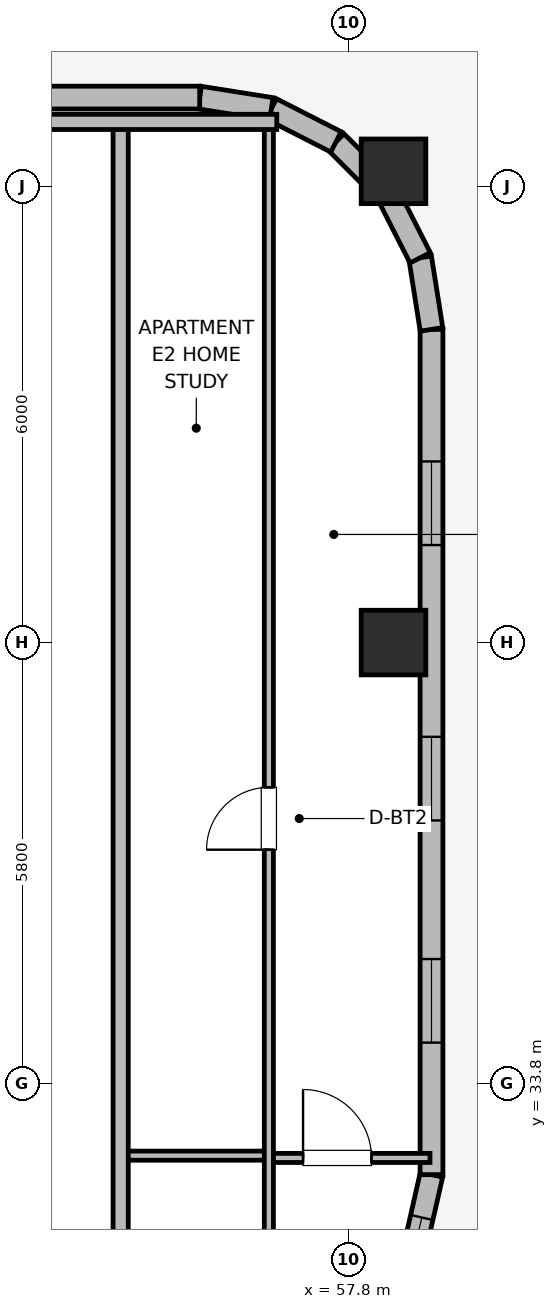
"""IFC4 building model, lengths in metres.
Left out: names, types, materials, properties, quantities, classifications, styles, units other than length and angle.
Written with IfcOpenShell. Run it as: python <this file> out.ifc"""

import sys

from ifc_helpers import new_model, si_unit, direction, frame, frame_2d, origin, origin_2d, place, context, subcontext, project, spatial, rectangle, extrude, element, fill, save


model = new_model("IFC4")
c1 = context("Model", 3, precision=1e-05, world=origin(), true_north=direction((0.0, 1.0)))
c2 = subcontext(c1, "Body", "Model", "MODEL_VIEW")
j1 = project(units=[si_unit("LENGTHUNIT", "METRE"), si_unit("PLANEANGLEUNIT", "RADIAN")], contexts=[c1])
p1 = place(None, origin())
s1 = spatial("IfcSite", under=j1, at=p1, CompositionType="ELEMENT")
p2 = place(p1, origin())
s2 = spatial("IfcBuilding", under=s1, at=p2, CompositionType="ELEMENT")
p3 = place(p2, frame((0.0, 0.0, 225.8)))
s3 = spatial("IfcBuildingStorey", under=s2, at=p3, CompositionType="ELEMENT", Elevation=225.8)
for number, where, z_axis, x_axis in (
    (1, (58.39, 39.6, 0.0), (0.0, 0.0, 1.0), (1.0, 0.0, 0.0)),
    (2, (58.39, 45.8, 0.0), (0.0, 0.0, 1.0), (1.0, 0.0, 0.0)),
):
    element("IfcColumn", number, at=place(p3, frame(where, z_axis=z_axis, x_axis=x_axis)), inside=s3, PredefinedType="COLUMN", context=c2, shape_type="SweptSolid", body=[
        extrude(rectangle(XDim=0.85, YDim=0.85, at=origin_2d()), origin(), (0.0, 0.0, 1.0), 3.7),
    ])
p4 = place(p3, frame((58.39, 30.4, 0.0), z_axis=(0.0, 0.0, 1.0), x_axis=(0.221602396322, 0.975137107254, 0.0)))
e3 = element("IfcWall", 3, at=p4, inside=s3, PredefinedType="SOLIDWALL", context=c2, shape_type="SweptSolid", body=[
    extrude(rectangle(XDim=2.256, YDim=0.3, at=frame_2d((1.128, 0.0))), origin(), (0.0, 0.0, 1.0), 2.73),
])
p5 = place(p4, frame((0.578, 0.0, 0.92)))
e4 = element("IfcOpeningElement", 4, at=p5, cuts=e3, PredefinedType="OPENING", context=c2, shape_type="SweptSolid", body=[
    extrude(rectangle(XDim=1.1, YDim=1.65, at=frame_2d((0.55, 0.825))), frame((0.0, 0.16, 0.0), z_axis=(0.0, -1.0, 0.0), x_axis=(1.0, 0.0, 0.0)), (0.0, 0.0, 1.0), 0.32),
])
p6 = place(p3, frame((58.89, 32.6, 0.0), z_axis=(0.0, 0.0, 1.0), x_axis=(0.0, 1.0, 0.0)))
e5 = element("IfcWall", 5, at=p6, inside=s3, PredefinedType="SOLIDWALL", context=c2, shape_type="SweptSolid", body=[
    extrude(rectangle(XDim=11.12, YDim=0.3, at=frame_2d((5.56, 0.0))), origin(), (0.0, 0.0, 1.0), 2.73),
])
p7 = place(p6, frame((1.737, 0.0, 0.95)))
e6 = element("IfcOpeningElement", 6, at=p7, cuts=e5, PredefinedType="OPENING", context=c2, shape_type="SweptSolid", body=[
    extrude(rectangle(XDim=1.1, YDim=1.65, at=frame_2d((0.55, 0.825))), frame((0.0, 0.16, 0.0), z_axis=(0.0, -1.0, 0.0), x_axis=(1.0, 0.0, 0.0)), (0.0, 0.0, 1.0), 0.32),
])
p8 = place(p6, frame((4.66, 0.0, 0.95)))
e7 = element("IfcOpeningElement", 7, at=p8, cuts=e5, PredefinedType="OPENING", context=c2, shape_type="SweptSolid", body=[
    extrude(rectangle(XDim=1.1, YDim=1.65, at=frame_2d((0.55, 0.825))), frame((0.0, 0.16, 0.0), z_axis=(0.0, -1.0, 0.0), x_axis=(1.0, 0.0, 0.0)), (0.0, 0.0, 1.0), 0.32),
])
p9 = place(p6, frame((8.283, 0.0, 0.95)))
e8 = element("IfcOpeningElement", 8, at=p9, cuts=e5, PredefinedType="OPENING", context=c2, shape_type="SweptSolid", body=[
    extrude(rectangle(XDim=1.1, YDim=1.65, at=frame_2d((0.55, 0.825))), frame((0.0, 0.16, 0.0), z_axis=(0.0, -1.0, 0.0), x_axis=(1.0, 0.0, 0.0)), (0.0, 0.0, 1.0), 0.32),
])
p10 = place(p3, frame((58.89, 43.72, 0.0), z_axis=(0.0, 0.0, 1.0), x_axis=(-0.156304114255, 0.987708977314, 0.0)))
e9 = element("IfcWall", 9, at=p10, inside=s3, PredefinedType="SOLIDWALL", context=c2, shape_type="SweptSolid", body=[
    extrude(rectangle(XDim=0.954, YDim=0.3, at=frame_2d((0.477, 0.0))), origin(), (0.0, 0.0, 1.0), 2.73),
])
p11 = place(p3, frame((58.741, 44.663, 0.0), z_axis=(0.0, 0.0, 1.0), x_axis=(-0.45395644796, 0.891023873617, 0.0)))
e10 = element("IfcWall", 10, at=p11, inside=s3, PredefinedType="SOLIDWALL", context=c2, shape_type="SweptSolid", body=[
    extrude(rectangle(XDim=0.954, YDim=0.3, at=frame_2d((0.477, 0.0))), origin(), (0.0, 0.0, 1.0), 2.73),
])
for number, where, z_axis, x_axis in (
    (11, (58.308, 45.513, 0.0), (0.0, 0.0, 1.0), (-0.707, 0.707, 0.0)),
    (12, (57.633, 46.188, 0.0), (0.0, 0.0, 1.0), (-0.891, 0.454, 0.0)),
):
    element("IfcWall", number, at=place(p3, frame(where, z_axis=z_axis, x_axis=x_axis)), inside=s3, PredefinedType="SOLIDWALL", context=c2, shape_type="SweptSolid", body=[
        extrude(rectangle(XDim=0.954, YDim=0.3, at=frame_2d((0.477, 0.0))), origin(), (0.0, 0.0, 1.0), 2.73),
    ])
p12 = place(p3, frame((56.782, 46.621, 0.0), z_axis=(0.0, 0.0, 1.0), x_axis=(-0.987663181641, 0.156593229835, 0.0)))
e13 = element("IfcWall", 13, at=p12, inside=s3, PredefinedType="SOLIDWALL", context=c2, shape_type="SweptSolid", body=[
    extrude(rectangle(XDim=0.954, YDim=0.3, at=frame_2d((0.477, 0.0))), origin(), (0.0, 0.0, 1.0), 2.73),
])
p13 = place(p3, frame((55.84, 46.77, 0.0), z_axis=(0.0, 0.0, 1.0), x_axis=(-1.0, 0.0, 0.0)))
e14 = element("IfcWall", 14, at=p13, inside=s3, PredefinedType="SOLIDWALL", context=c2, shape_type="SweptSolid", body=[
    extrude(rectangle(XDim=33.28, YDim=0.3, at=frame_2d((16.64, 0.0))), origin(), (0.0, 0.0, 1.0), 2.73),
])
p14 = place(p13, frame((4.93, 0.0, 0.71)))
e15 = element("IfcOpeningElement", 15, at=p14, cuts=e14, PredefinedType="OPENING", context=c2, shape_type="SweptSolid", body=[
    extrude(rectangle(XDim=2.1, YDim=1.9, at=frame_2d((1.05, 0.95))), frame((0.0, 0.16, 0.0), z_axis=(0.0, -1.0, 0.0), x_axis=(1.0, 0.0, 0.0)), (0.0, 0.0, 1.0), 0.32),
])
p15 = place(p13, frame((8.483, 0.0, 0.71)))
e16 = element("IfcOpeningElement", 16, at=p15, cuts=e14, PredefinedType="OPENING", context=c2, shape_type="SweptSolid", body=[
    extrude(rectangle(XDim=2.1, YDim=1.9, at=frame_2d((1.05, 0.95))), frame((0.0, 0.16, 0.0), z_axis=(0.0, -1.0, 0.0), x_axis=(1.0, 0.0, 0.0)), (0.0, 0.0, 1.0), 0.32),
])
p16 = place(p13, frame((15.59, 0.0, 0.71)))
e17 = element("IfcOpeningElement", 17, at=p16, cuts=e14, PredefinedType="OPENING", context=c2, shape_type="SweptSolid", body=[
    extrude(rectangle(XDim=2.1, YDim=1.9, at=frame_2d((1.05, 0.95))), frame((0.0, 0.16, 0.0), z_axis=(0.0, -1.0, 0.0), x_axis=(1.0, 0.0, 0.0)), (0.0, 0.0, 1.0), 0.32),
])
p17 = place(p13, frame((22.697, 0.0, 0.71)))
e18 = element("IfcOpeningElement", 18, at=p17, cuts=e14, PredefinedType="OPENING", context=c2, shape_type="SweptSolid", body=[
    extrude(rectangle(XDim=2.1, YDim=1.9, at=frame_2d((1.05, 0.95))), frame((0.0, 0.16, 0.0), z_axis=(0.0, -1.0, 0.0), x_axis=(1.0, 0.0, 0.0)), (0.0, 0.0, 1.0), 0.32),
])
p18 = place(p13, frame((26.25, 0.0, 0.71)))
e19 = element("IfcOpeningElement", 19, at=p18, cuts=e14, PredefinedType="OPENING", context=c2, shape_type="SweptSolid", body=[
    extrude(rectangle(XDim=2.1, YDim=1.9, at=frame_2d((1.05, 0.95))), frame((0.0, 0.16, 0.0), z_axis=(0.0, -1.0, 0.0), x_axis=(1.0, 0.0, 0.0)), (0.0, 0.0, 1.0), 0.32),
])
p19 = place(p3, frame((54.8, 32.85, 0.0), z_axis=(0.0, 0.0, 1.0), x_axis=(1.0, 0.0, 0.0)))
e20 = element("IfcWall", 20, at=p19, inside=s3, PredefinedType="PARTITIONING", context=c2, shape_type="SweptSolid", body=[
    extrude(rectangle(XDim=1.95, YDim=0.12, at=frame_2d((0.975, 0.0))), origin(), (0.0, 0.0, 1.0), 2.56),
])
p20 = place(p3, frame((56.75, 32.82, 0.0), z_axis=(0.0, 0.0, 1.0), x_axis=(1.0, 0.0, 0.0)))
e21 = element("IfcWall", 21, at=p20, inside=s3, PredefinedType="PARTITIONING", context=c2, shape_type="SweptSolid", body=[
    extrude(rectangle(XDim=2.12, YDim=0.12, at=frame_2d((1.06, 0.0))), origin(), (0.0, 0.0, 1.0), 2.56),
])
p21 = place(p20, frame((0.45, 0.0, 0.0)))
e22 = element("IfcOpeningElement", 22, at=p21, cuts=e21, PredefinedType="OPENING", context=c2, shape_type="SweptSolid", body=[
    extrude(rectangle(XDim=0.9, YDim=2.1, at=frame_2d((0.45, 1.05))), frame((0.0, 0.07, 0.0), z_axis=(0.0, -1.0, 0.0), x_axis=(1.0, 0.0, 0.0)), (0.0, 0.0, 1.0), 0.14),
])
p22 = place(p3, frame((56.75, 23.69, 0.0), z_axis=(0.0, 0.0, 1.0), x_axis=(0.0, 1.0, 0.0)))
e23 = element("IfcWall", 23, at=p22, inside=s3, PredefinedType="PARTITIONING", context=c2, shape_type="SweptSolid", body=[
    extrude(rectangle(XDim=22.72, YDim=0.12, at=frame_2d((11.36, 0.0))), origin(), (0.0, 0.0, 1.0), 2.56),
])
p23 = place(p22, frame((0.41, 0.0, 0.0)))
e24 = element("IfcOpeningElement", 24, at=p23, cuts=e23, PredefinedType="OPENING", context=c2, shape_type="SweptSolid", body=[
    extrude(rectangle(XDim=0.9, YDim=2.1, at=frame_2d((0.45, 1.05))), frame((0.0, 0.07, 0.0), z_axis=(0.0, -1.0, 0.0), x_axis=(1.0, 0.0, 0.0)), (0.0, 0.0, 1.0), 0.14),
])
p24 = place(p22, frame((13.185, 0.0, 0.0)))
e25 = element("IfcOpeningElement", 25, at=p24, cuts=e23, PredefinedType="OPENING", context=c2, shape_type="SweptSolid", body=[
    extrude(rectangle(XDim=0.82, YDim=2.08, at=frame_2d((0.41, 1.04))), frame((0.0, 0.07, 0.0), z_axis=(0.0, -1.0, 0.0), x_axis=(1.0, 0.0, 0.0)), (0.0, 0.0, 1.0), 0.14),
])
p25 = place(p3, frame((54.8, 9.95, 0.0), z_axis=(0.0, 0.0, 1.0), x_axis=(0.0, 1.0, 0.0)))
e26 = element("IfcWall", 26, at=p25, inside=s3, PredefinedType="PARTITIONING", context=c2, shape_type="SweptSolid", body=[
    extrude(rectangle(XDim=36.5, YDim=0.2, at=frame_2d((18.25, 0.0))), origin(), (0.0, 0.0, 1.0), 2.56),
])
p26 = place(p25, frame((3.25, 0.0, 0.0)))
e27 = element("IfcOpeningElement", 27, at=p26, cuts=e26, PredefinedType="OPENING", context=c2, shape_type="SweptSolid", body=[
    extrude(rectangle(XDim=1.0, YDim=2.15, at=frame_2d((0.5, 1.075))), frame((0.0, 0.11, 0.0), z_axis=(0.0, -1.0, 0.0), x_axis=(1.0, 0.0, 0.0)), (0.0, 0.0, 1.0), 0.22),
])
p27 = place(p25, frame((14.25, 0.0, 0.0)))
e28 = element("IfcOpeningElement", 28, at=p27, cuts=e26, PredefinedType="OPENING", context=c2, shape_type="SweptSolid", body=[
    extrude(rectangle(XDim=1.0, YDim=2.15, at=frame_2d((0.5, 1.075))), frame((0.0, 0.11, 0.0), z_axis=(0.0, -1.0, 0.0), x_axis=(1.0, 0.0, 0.0)), (0.0, 0.0, 1.0), 0.22),
])
p28 = place(p3, frame((53.1, 46.45, 0.0), z_axis=(0.0, 0.0, 1.0), x_axis=(1.0, 0.0, 0.0)))
e29 = element("IfcWall", 29, at=p28, inside=s3, PredefinedType="PARTITIONING", context=c2, shape_type="SweptSolid", body=[
    extrude(rectangle(XDim=3.754, YDim=0.2, at=frame_2d((1.877, 0.0))), origin(), (0.0, 0.0, 1.0), 2.56),
])
p29 = place(p5, origin())
e30 = element("IfcWindow", 30, at=p29, inside=s3, PartitioningType="SINGLE_PANEL", PredefinedType="WINDOW", context=c2, shape_type="SweptSolid", body=[
    extrude(rectangle(XDim=1.1, YDim=1.65, at=frame_2d((0.55, 0.825))), frame((0.0, 0.03, 0.0), z_axis=(0.0, -1.0, 0.0), x_axis=(1.0, 0.0, 0.0)), (0.0, 0.0, 1.0), 0.06),
])
fill(e4, e30)
p30 = place(p7, origin())
e31 = element("IfcWindow", 31, at=p30, inside=s3, PartitioningType="SINGLE_PANEL", PredefinedType="WINDOW", context=c2, shape_type="SweptSolid", body=[
    extrude(rectangle(XDim=1.1, YDim=1.65, at=frame_2d((0.55, 0.825))), frame((0.0, 0.03, 0.0), z_axis=(0.0, -1.0, 0.0), x_axis=(1.0, 0.0, 0.0)), (0.0, 0.0, 1.0), 0.06),
])
fill(e6, e31)
p31 = place(p8, origin())
e32 = element("IfcWindow", 32, at=p31, inside=s3, PartitioningType="SINGLE_PANEL", PredefinedType="WINDOW", context=c2, shape_type="SweptSolid", body=[
    extrude(rectangle(XDim=1.1, YDim=1.65, at=frame_2d((0.55, 0.825))), frame((0.0, 0.03, 0.0), z_axis=(0.0, -1.0, 0.0), x_axis=(1.0, 0.0, 0.0)), (0.0, 0.0, 1.0), 0.06),
])
fill(e7, e32)
p32 = place(p9, origin())
e33 = element("IfcWindow", 33, at=p32, inside=s3, PartitioningType="SINGLE_PANEL", PredefinedType="WINDOW", context=c2, shape_type="SweptSolid", body=[
    extrude(rectangle(XDim=1.1, YDim=1.65, at=frame_2d((0.55, 0.825))), frame((0.0, 0.03, 0.0), z_axis=(0.0, -1.0, 0.0), x_axis=(1.0, 0.0, 0.0)), (0.0, 0.0, 1.0), 0.06),
])
fill(e8, e33)
p33 = place(p21, origin())
e34 = element("IfcDoor", 34, at=p33, inside=s3, OperationType="SINGLE_SWING_LEFT", PredefinedType="DOOR", context=c2, shape_type="SweptSolid", body=[
    extrude(rectangle(XDim=0.9, YDim=2.1, at=frame_2d((0.45, 1.05))), frame((0.0, 0.025, 0.0), z_axis=(0.0, -1.0, 0.0), x_axis=(1.0, 0.0, 0.0)), (0.0, 0.0, 1.0), 0.05),
])
fill(e22, e34)
p34 = place(p24, origin())
e35 = element("IfcDoor", 35, at=p34, inside=s3, OperationType="SINGLE_SWING_LEFT", PredefinedType="DOOR", context=c2, shape_type="SweptSolid", body=[
    extrude(rectangle(XDim=0.82, YDim=2.08, at=frame_2d((0.41, 1.04))), frame((0.0, 0.025, 0.0), z_axis=(0.0, -1.0, 0.0), x_axis=(1.0, 0.0, 0.0)), (0.0, 0.0, 1.0), 0.05),
])
fill(e25, e35)
save(model, sys.argv[1])
